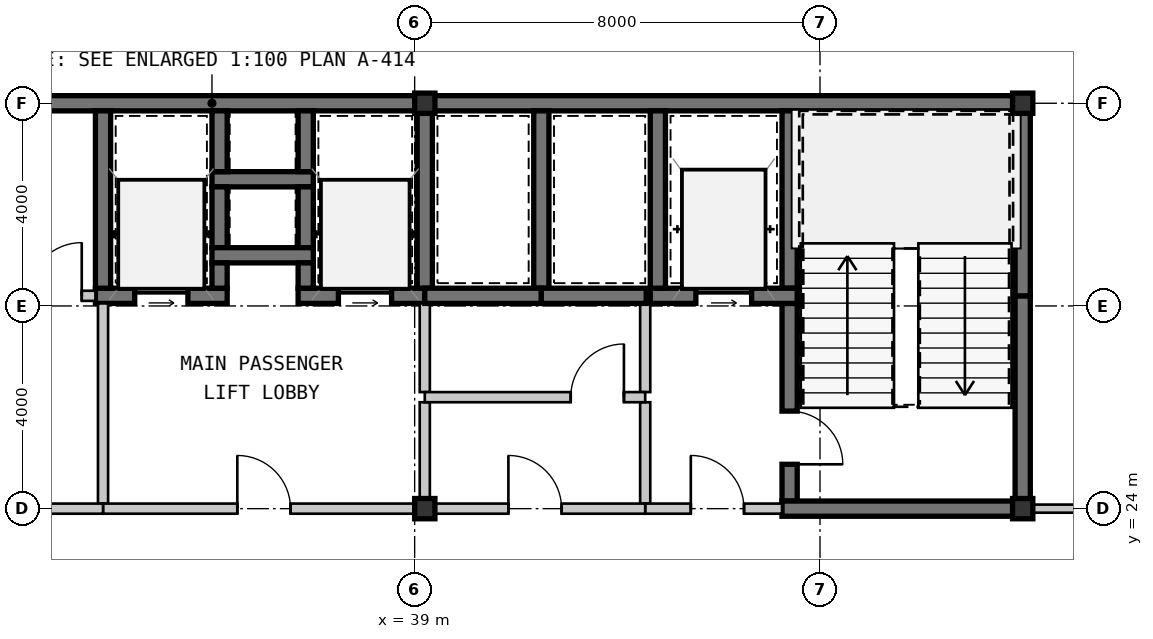
"""IFC4 building model, lengths in metres.
Left out: names, types, materials, properties, quantities, classifications, styles, units other than length and angle.
Written with IfcOpenShell. Run it as: python <this file> out.ifc"""

import sys

from ifc_helpers import new_model, si_unit, direction, frame, frame_2d, origin, origin_2d, place, context, subcontext, project, spatial, rectangle, hollow_rectangle, extrude, source, transform, mapped, element, fill, save


model = new_model("IFC4")
c1 = context("Model", 3, precision=1e-05, world=origin(), true_north=direction((0.0, 1.0)))
c2 = subcontext(c1, "Body", "Model", "MODEL_VIEW")
j1 = project(units=[si_unit("LENGTHUNIT", "METRE"), si_unit("PLANEANGLEUNIT", "RADIAN")], contexts=[c1])
p1 = place(None, origin())
s1 = spatial("IfcSite", under=j1, at=p1, CompositionType="ELEMENT")
p2 = place(p1, origin())
s2 = spatial("IfcBuilding", under=s1, at=p2, CompositionType="ELEMENT")
p3 = place(p2, frame((0.0, 0.0, 126.7)))
s3 = spatial("IfcBuildingStorey", under=s2, at=p3, CompositionType="ELEMENT", Elevation=126.7)
m1 = source(origin(), c2, "Body", "SweptSolid", [
    extrude(hollow_rectangle(XDim=0.4, YDim=0.4, WallThickness=0.016, at=origin_2d()), origin(), (0.0, 0.0, 1.0), 3.15),
])
for number, where, z_axis, x_axis in (
    (1, (39.2, 24.0, 0.0), (0.0, 0.0, 1.0), (1.0, 0.0, 0.0)),
    (2, (51.0, 24.0, 0.0), (0.0, 0.0, 1.0), (1.0, 0.0, 0.0)),
    (3, (39.2, 32.0, 0.0), (0.0, 0.0, 1.0), (1.0, 0.0, 0.0)),
    (4, (51.0, 32.0, 0.0), (0.0, 0.0, 1.0), (1.0, 0.0, 0.0)),
):
    element("IfcColumn", number, at=place(p3, frame(where, z_axis=z_axis, x_axis=x_axis)), inside=s3, PredefinedType="COLUMN", context=c2, shape_type="MappedRepresentation", body=[
        mapped(m1, transform((0.0, 0.0, 0.0), scale=1.0)),
    ])
m2 = source(origin(), c2, "Body", "SweptSolid", [
    extrude(rectangle(XDim=11.2, YDim=0.3, at=frame_2d((5.6, 0.0))), origin(), (0.0, 0.0, 1.0), 2.93),
])
p4 = place(p3, frame((28.0, 32.0, 0.0), z_axis=(0.0, 0.0, 1.0), x_axis=(1.0, 0.0, 0.0)))
e5 = element("IfcWall", 5, at=p4, inside=s3, PredefinedType="SHEAR", context=c2, shape_type="MappedRepresentation", body=[
    mapped(m2, transform((0.0, 0.0, 0.0), scale=1.0)),
])
m3 = source(origin(), c2, "Body", "SweptSolid", [
    extrude(rectangle(XDim=11.95, YDim=0.3, at=frame_2d((5.975, 0.0))), origin(), (0.0, 0.0, 1.0), 2.93),
])
p5 = place(p3, frame((39.2, 32.0, 0.0), z_axis=(0.0, 0.0, 1.0), x_axis=(1.0, 0.0, 0.0)))
e6 = element("IfcWall", 6, at=p5, inside=s3, PredefinedType="SHEAR", context=c2, shape_type="MappedRepresentation", body=[
    mapped(m3, transform((0.0, 0.0, 0.0), scale=1.0)),
])
m4 = source(origin(), c2, "Body", "SweptSolid", [
    extrude(rectangle(XDim=4.05, YDim=0.3, at=frame_2d((2.025, 0.0))), origin(), (0.0, 0.0, 1.0), 2.93),
])
p6 = place(p3, frame((51.0, 24.15, 0.0), z_axis=(0.0, 0.0, 1.0), x_axis=(0.0, 1.0, 0.0)))
e7 = element("IfcWall", 7, at=p6, inside=s3, PredefinedType="SHEAR", context=c2, shape_type="MappedRepresentation", body=[
    mapped(m4, transform((0.0, 0.0, 0.0), scale=1.0)),
])
m5 = source(origin(), c2, "Body", "SweptSolid", [
    extrude(rectangle(XDim=3.65, YDim=0.3, at=frame_2d((1.825, 0.0))), origin(), (0.0, 0.0, 1.0), 2.93),
])
p7 = place(p3, frame((51.0, 28.2, 0.0), z_axis=(0.0, 0.0, 1.0), x_axis=(0.0, 1.0, 0.0)))
e8 = element("IfcWall", 8, at=p7, inside=s3, PredefinedType="SHEAR", context=c2, shape_type="MappedRepresentation", body=[
    mapped(m5, transform((0.0, 0.0, 0.0), scale=1.0)),
])
m6 = source(origin(), c2, "Body", "SweptSolid", [
    extrude(rectangle(XDim=3.5, YDim=0.3, at=frame_2d((1.75, 0.0))), origin(), (0.0, 0.0, 1.0), 2.93),
])
p8 = place(p3, frame((46.4, 31.85, 0.0), z_axis=(0.0, 0.0, 1.0), x_axis=(0.0, -1.0, 0.0)))
e9 = element("IfcWall", 9, at=p8, inside=s3, PredefinedType="SHEAR", context=c2, shape_type="MappedRepresentation", body=[
    mapped(m6, transform((0.0, 0.0, 0.0), scale=1.0)),
])
m7 = source(origin(), c2, "Body", "SweptSolid", [
    extrude(rectangle(XDim=3.9, YDim=0.3, at=frame_2d((1.95, 0.0))), origin(), (0.0, 0.0, 1.0), 2.93),
])
p9 = place(p3, frame((46.4, 28.05, 0.0), z_axis=(0.0, 0.0, 1.0), x_axis=(0.0, -1.0, 0.0)))
e10 = element("IfcWall", 10, at=p9, inside=s3, PredefinedType="SHEAR", context=c2, shape_type="MappedRepresentation", body=[
    mapped(m7, transform((0.0, 0.0, 0.0), scale=1.0)),
])
m8 = source(origin(), c2, "Body", "SweptSolid", [
    extrude(rectangle(XDim=1.05, YDim=2.1, at=frame_2d((0.525, 1.05))), frame((0.0, 0.16, 0.0), z_axis=(0.0, -1.0, 0.0), x_axis=(1.0, 0.0, 0.0)), (0.0, 0.0, 1.0), 0.32),
])
p10 = place(p9, frame((2.125, 0.0, 0.0)))
e11 = element("IfcOpeningElement", 11, at=p10, cuts=e10, PredefinedType="OPENING", context=c2, shape_type="MappedRepresentation", body=[
    mapped(m8, transform((0.0, 0.0, 0.0), scale=1.0)),
])
m9 = source(origin(), c2, "Body", "SweptSolid", [
    extrude(rectangle(XDim=4.9, YDim=0.3, at=frame_2d((2.45, 0.0))), origin(), (0.0, 0.0, 1.0), 2.93),
])
p11 = place(p3, frame((46.25, 24.0, 0.0), z_axis=(0.0, 0.0, 1.0), x_axis=(1.0, 0.0, 0.0)))
e12 = element("IfcWall", 12, at=p11, inside=s3, PredefinedType="SHEAR", context=c2, shape_type="MappedRepresentation", body=[
    mapped(m9, transform((0.0, 0.0, 0.0), scale=1.0)),
])
m10 = source(origin(), c2, "Body", "SweptSolid", [
    extrude(rectangle(XDim=2.9, YDim=0.3, at=frame_2d((1.45, 0.0))), origin(), (0.0, 0.0, 1.0), 2.93),
])
p12 = place(p3, frame((43.65, 28.2, 0.0), z_axis=(0.0, 0.0, 1.0), x_axis=(1.0, 0.0, 0.0)))
e13 = element("IfcWall", 13, at=p12, inside=s3, PredefinedType="SHEAR", context=c2, shape_type="MappedRepresentation", body=[
    mapped(m10, transform((0.0, 0.0, 0.0), scale=1.0)),
])
m11 = source(origin(), c2, "Body", "SweptSolid", [
    extrude(rectangle(XDim=1.1, YDim=2.15, at=frame_2d((0.55, 1.075))), frame((0.0, 0.16, 0.0), z_axis=(0.0, -1.0, 0.0), x_axis=(1.0, 0.0, 0.0)), (0.0, 0.0, 1.0), 0.32),
])
p13 = place(p12, frame((0.9, 0.0, 0.0)))
e14 = element("IfcOpeningElement", 14, at=p13, cuts=e13, PredefinedType="OPENING", context=c2, shape_type="MappedRepresentation", body=[
    mapped(m11, transform((0.0, 0.0, 0.0), scale=1.0)),
])
p14 = place(p3, frame((43.8, 31.85, 0.0), z_axis=(0.0, 0.0, 1.0), x_axis=(0.0, -1.0, 0.0)))
e15 = element("IfcWall", 15, at=p14, inside=s3, PredefinedType="SHEAR", context=c2, shape_type="MappedRepresentation", body=[
    mapped(m6, transform((0.0, 0.0, 0.0), scale=1.0)),
])
m12 = source(origin(), c2, "Body", "SweptSolid", [
    extrude(rectangle(XDim=2.0, YDim=0.2, at=frame_2d((1.0, 0.0))), origin(), (0.0, 0.0, 1.0), 2.93),
])
p15 = place(p3, frame((43.55, 26.1, 0.0), z_axis=(0.0, 0.0, 1.0), x_axis=(0.0, -1.0, 0.0)))
e16 = element("IfcWall", 16, at=p15, inside=s3, PredefinedType="SOLIDWALL", context=c2, shape_type="MappedRepresentation", body=[
    mapped(m12, transform((0.0, 0.0, 0.0), scale=1.0)),
])
m13 = source(origin(), c2, "Body", "SweptSolid", [
    extrude(rectangle(XDim=1.75, YDim=0.2, at=frame_2d((0.875, 0.0))), origin(), (0.0, 0.0, 1.0), 2.93),
])
p16 = place(p3, frame((43.55, 28.05, 0.0), z_axis=(0.0, 0.0, 1.0), x_axis=(0.0, -1.0, 0.0)))
e17 = element("IfcWall", 17, at=p16, inside=s3, PredefinedType="SOLIDWALL", context=c2, shape_type="MappedRepresentation", body=[
    mapped(m13, transform((0.0, 0.0, 0.0), scale=1.0)),
])
m14 = source(origin(), c2, "Body", "SweptSolid", [
    extrude(rectangle(XDim=2.7, YDim=0.2, at=frame_2d((1.35, 0.0))), origin(), (0.0, 0.0, 1.0), 2.397),
])
p17 = place(p3, frame((43.55, 24.0, 0.0), z_axis=(0.0, 0.0, 1.0), x_axis=(1.0, 0.0, 0.0)))
e18 = element("IfcWall", 18, at=p17, inside=s3, PredefinedType="SOLIDWALL", context=c2, shape_type="MappedRepresentation", body=[
    mapped(m14, transform((0.0, 0.0, 0.0), scale=1.0)),
])
m15 = source(origin(), c2, "Body", "SweptSolid", [
    extrude(rectangle(XDim=1.05, YDim=2.1, at=frame_2d((0.525, 1.05))), frame((0.0, 0.11, 0.0), z_axis=(0.0, -1.0, 0.0), x_axis=(1.0, 0.0, 0.0)), (0.0, 0.0, 1.0), 0.22),
])
p18 = place(p17, frame((0.9, 0.0, 0.0)))
e19 = element("IfcOpeningElement", 19, at=p18, cuts=e18, PredefinedType="OPENING", context=c2, shape_type="MappedRepresentation", body=[
    mapped(m15, transform((0.0, 0.0, 0.0), scale=1.0)),
])
m16 = source(origin(), c2, "Body", "SweptSolid", [
    extrude(rectangle(XDim=2.0, YDim=0.3, at=frame_2d((1.0, 0.0))), origin(), (0.0, 0.0, 1.0), 2.93),
])
p19 = place(p3, frame((35.0, 30.5, 0.0), z_axis=(0.0, 0.0, 1.0), x_axis=(1.0, 0.0, 0.0)))
e20 = element("IfcWall", 20, at=p19, inside=s3, PredefinedType="SHEAR", context=c2, shape_type="MappedRepresentation", body=[
    mapped(m16, transform((0.0, 0.0, 0.0), scale=1.0)),
])
m17 = source(origin(), c2, "Body", "SweptSolid", [
    extrude(rectangle(XDim=1.2, YDim=0.3, at=frame_2d((0.6, 0.0))), origin(), (0.0, 0.0, 1.0), 2.93),
])
for number, where, z_axis, x_axis in (
    (21, (35.15, 31.85, 0.0), (0.0, 0.0, 1.0), (0.0, -1.0, 0.0)),
    (22, (36.85, 30.65, 0.0), (0.0, 0.0, 1.0), (0.0, 1.0, 0.0)),
    (23, (35.15, 30.35, 0.0), (0.0, 0.0, 1.0), (0.0, -1.0, 0.0)),
    (24, (36.85, 29.15, 0.0), (0.0, 0.0, 1.0), (0.0, 1.0, 0.0)),
):
    element("IfcWall", number, at=place(p3, frame(where, z_axis=z_axis, x_axis=x_axis)), inside=s3, PredefinedType="SHEAR", context=c2, shape_type="MappedRepresentation", body=[
        mapped(m17, transform((0.0, 0.0, 0.0), scale=1.0)),
    ])
p20 = place(p3, frame((35.0, 29.0, 0.0), z_axis=(0.0, 0.0, 1.0), x_axis=(1.0, 0.0, 0.0)))
e25 = element("IfcWall", 25, at=p20, inside=s3, PredefinedType="SHEAR", context=c2, shape_type="MappedRepresentation", body=[
    mapped(m16, transform((0.0, 0.0, 0.0), scale=1.0)),
])
m18 = source(origin(), c2, "Body", "SweptSolid", [
    extrude(rectangle(XDim=2.6, YDim=0.3, at=frame_2d((1.3, 0.0))), origin(), (0.0, 0.0, 1.0), 2.93),
])
p21 = place(p3, frame((32.7, 28.2, 0.0), z_axis=(0.0, 0.0, 1.0), x_axis=(1.0, 0.0, 0.0)))
e26 = element("IfcWall", 26, at=p21, inside=s3, PredefinedType="SHEAR", context=c2, shape_type="MappedRepresentation", body=[
    mapped(m18, transform((0.0, 0.0, 0.0), scale=1.0)),
])
m19 = source(origin(), c2, "Body", "SweptSolid", [
    extrude(rectangle(XDim=1.05, YDim=2.15, at=frame_2d((0.525, 1.075))), frame((0.0, 0.16, 0.0), z_axis=(0.0, -1.0, 0.0), x_axis=(1.0, 0.0, 0.0)), (0.0, 0.0, 1.0), 0.32),
])
p22 = place(p21, frame((0.775, 0.0, 0.0)))
e27 = element("IfcOpeningElement", 27, at=p22, cuts=e26, PredefinedType="OPENING", context=c2, shape_type="MappedRepresentation", body=[
    mapped(m19, transform((0.0, 0.0, 0.0), scale=1.0)),
])
m20 = source(origin(), c2, "Body", "SweptSolid", [
    extrude(rectangle(XDim=0.5, YDim=0.3, at=frame_2d((0.25, 0.0))), origin(), (0.0, 0.0, 1.0), 2.93),
])
p23 = place(p3, frame((35.15, 28.35, 0.0), z_axis=(0.0, 0.0, 1.0), x_axis=(0.0, 1.0, 0.0)))
e28 = element("IfcWall", 28, at=p23, inside=s3, PredefinedType="SHEAR", context=c2, shape_type="MappedRepresentation", body=[
    mapped(m20, transform((0.0, 0.0, 0.0), scale=1.0)),
])
p24 = place(p3, frame((32.85, 31.85, 0.0), z_axis=(0.0, 0.0, 1.0), x_axis=(0.0, -1.0, 0.0)))
e29 = element("IfcWall", 29, at=p24, inside=s3, PredefinedType="SHEAR", context=c2, shape_type="MappedRepresentation", body=[
    mapped(m6, transform((0.0, 0.0, 0.0), scale=1.0)),
])
m21 = source(origin(), c2, "Body", "SweptSolid", [
    extrude(rectangle(XDim=2.5, YDim=0.3, at=frame_2d((1.25, 0.0))), origin(), (0.0, 0.0, 1.0), 2.93),
])
p25 = place(p3, frame((36.7, 28.2, 0.0), z_axis=(0.0, 0.0, 1.0), x_axis=(1.0, 0.0, 0.0)))
e30 = element("IfcWall", 30, at=p25, inside=s3, PredefinedType="SHEAR", context=c2, shape_type="MappedRepresentation", body=[
    mapped(m21, transform((0.0, 0.0, 0.0), scale=1.0)),
])
p26 = place(p25, frame((0.795, 0.0, 0.0)))
e31 = element("IfcOpeningElement", 31, at=p26, cuts=e30, PredefinedType="OPENING", context=c2, shape_type="MappedRepresentation", body=[
    mapped(m19, transform((0.0, 0.0, 0.0), scale=1.0)),
])
p27 = place(p3, frame((36.85, 28.85, 0.0), z_axis=(0.0, 0.0, 1.0), x_axis=(0.0, -1.0, 0.0)))
e32 = element("IfcWall", 32, at=p27, inside=s3, PredefinedType="SHEAR", context=c2, shape_type="MappedRepresentation", body=[
    mapped(m20, transform((0.0, 0.0, 0.0), scale=1.0)),
])
p28 = place(p3, frame((39.2, 28.35, 0.0), z_axis=(0.0, 0.0, 1.0), x_axis=(0.0, 1.0, 0.0)))
e33 = element("IfcWall", 33, at=p28, inside=s3, PredefinedType="SHEAR", context=c2, shape_type="MappedRepresentation", body=[
    mapped(m6, transform((0.0, 0.0, 0.0), scale=1.0)),
])
m22 = source(origin(), c2, "Body", "SweptSolid", [
    extrude(rectangle(XDim=3.95, YDim=0.2, at=frame_2d((1.975, 0.0))), origin(), (0.0, 0.0, 1.0), 2.93),
])
p29 = place(p3, frame((32.85, 24.1, 0.0), z_axis=(0.0, 0.0, 1.0), x_axis=(0.0, 1.0, 0.0)))
e34 = element("IfcWall", 34, at=p29, inside=s3, PredefinedType="SOLIDWALL", context=c2, shape_type="MappedRepresentation", body=[
    mapped(m22, transform((0.0, 0.0, 0.0), scale=1.0)),
])
m23 = source(origin(), c2, "Body", "SweptSolid", [
    extrude(rectangle(XDim=2.0, YDim=0.2, at=frame_2d((1.0, 0.0))), origin(), (0.0, 0.0, 1.0), 2.47),
])
p30 = place(p3, frame((39.2, 26.1, 0.0), z_axis=(0.0, 0.0, 1.0), x_axis=(0.0, -1.0, 0.0)))
e35 = element("IfcWall", 35, at=p30, inside=s3, PredefinedType="SOLIDWALL", context=c2, shape_type="MappedRepresentation", body=[
    mapped(m23, transform((0.0, 0.0, 0.0), scale=1.0)),
])
m24 = source(origin(), c2, "Body", "SweptSolid", [
    extrude(rectangle(XDim=1.75, YDim=0.2, at=frame_2d((0.875, 0.0))), origin(), (0.0, 0.0, 1.0), 2.47),
])
p31 = place(p3, frame((39.2, 28.05, 0.0), z_axis=(0.0, 0.0, 1.0), x_axis=(0.0, -1.0, 0.0)))
e36 = element("IfcWall", 36, at=p31, inside=s3, PredefinedType="SOLIDWALL", context=c2, shape_type="MappedRepresentation", body=[
    mapped(m24, transform((0.0, 0.0, 0.0), scale=1.0)),
])
m25 = source(origin(), c2, "Body", "SweptSolid", [
    extrude(rectangle(XDim=6.35, YDim=0.2, at=frame_2d((3.175, 0.0))), origin(), (0.0, 0.0, 1.0), 2.47),
])
p32 = place(p3, frame((39.2, 24.0, 0.0), z_axis=(0.0, 0.0, 1.0), x_axis=(-1.0, 0.0, 0.0)))
e37 = element("IfcWall", 37, at=p32, inside=s3, PredefinedType="SOLIDWALL", context=c2, shape_type="MappedRepresentation", body=[
    mapped(m25, transform((0.0, 0.0, 0.0), scale=1.0)),
])
p33 = place(p32, frame((2.65, 0.0, 0.0)))
e38 = element("IfcOpeningElement", 38, at=p33, cuts=e37, PredefinedType="OPENING", context=c2, shape_type="MappedRepresentation", body=[
    mapped(m15, transform((0.0, 0.0, 0.0), scale=1.0)),
])
p34 = place(p3, frame((41.5, 28.35, 0.0), z_axis=(0.0, 0.0, 1.0), x_axis=(0.0, 1.0, 0.0)))
e39 = element("IfcWall", 39, at=p34, inside=s3, PredefinedType="SHEAR", context=c2, shape_type="MappedRepresentation", body=[
    mapped(m6, transform((0.0, 0.0, 0.0), scale=1.0)),
])
m26 = source(origin(), c2, "Body", "SweptSolid", [
    extrude(rectangle(XDim=2.3, YDim=0.3, at=frame_2d((1.15, 0.0))), origin(), (0.0, 0.0, 1.0), 2.93),
])
p35 = place(p3, frame((39.2, 28.2, 0.0), z_axis=(0.0, 0.0, 1.0), x_axis=(1.0, 0.0, 0.0)))
e40 = element("IfcWall", 40, at=p35, inside=s3, PredefinedType="SHEAR", context=c2, shape_type="MappedRepresentation", body=[
    mapped(m26, transform((0.0, 0.0, 0.0), scale=1.0)),
])
m27 = source(origin(), c2, "Body", "SweptSolid", [
    extrude(rectangle(XDim=2.07, YDim=0.3, at=frame_2d((1.035, 0.0))), origin(), (0.0, 0.0, 1.0), 2.93),
])
p36 = place(p3, frame((41.5, 28.2, 0.0), z_axis=(0.0, 0.0, 1.0), x_axis=(1.0, 0.0, 0.0)))
e41 = element("IfcWall", 41, at=p36, inside=s3, PredefinedType="SHEAR", context=c2, shape_type="MappedRepresentation", body=[
    mapped(m27, transform((0.0, 0.0, 0.0), scale=1.0)),
])
m28 = source(origin(), c2, "Body", "SweptSolid", [
    extrude(rectangle(XDim=6.25, YDim=0.2, at=frame_2d((3.125, 0.0))), origin(), (0.0, 0.0, 1.0), 2.93),
])
p37 = place(p3, frame((26.45, 28.2, 0.0), z_axis=(0.0, 0.0, 1.0), x_axis=(1.0, 0.0, 0.0)))
e42 = element("IfcWall", 42, at=p37, inside=s3, PredefinedType="SOLIDWALL", context=c2, shape_type="MappedRepresentation", body=[
    mapped(m28, transform((0.0, 0.0, 0.0), scale=1.0)),
])
p38 = place(p37, frame((4.93, 0.0, 0.0)))
e43 = element("IfcOpeningElement", 43, at=p38, cuts=e42, PredefinedType="OPENING", context=c2, shape_type="MappedRepresentation", body=[
    mapped(m15, transform((0.0, 0.0, 0.0), scale=1.0)),
])
m29 = source(origin(), c2, "Body", "SweptSolid", [
    extrude(rectangle(XDim=6.4, YDim=0.2, at=frame_2d((3.2, 0.0))), origin(), (0.0, 0.0, 1.0), 2.47),
])
p39 = place(p3, frame((32.85, 24.0, 0.0), z_axis=(0.0, 0.0, 1.0), x_axis=(-1.0, 0.0, 0.0)))
e44 = element("IfcWall", 44, at=p39, inside=s3, PredefinedType="SOLIDWALL", context=c2, shape_type="MappedRepresentation", body=[
    mapped(m29, transform((0.0, 0.0, 0.0), scale=1.0)),
])
p40 = place(p39, frame((2.675, 0.0, 0.0)))
e45 = element("IfcOpeningElement", 45, at=p40, cuts=e44, PredefinedType="OPENING", context=c2, shape_type="MappedRepresentation", body=[
    mapped(m15, transform((0.0, 0.0, 0.0), scale=1.0)),
])
m30 = source(origin(), c2, "Body", "SweptSolid", [
    extrude(rectangle(XDim=4.35, YDim=0.2, at=frame_2d((2.175, 0.0))), origin(), (0.0, 0.0, 1.0), 2.93),
])
p41 = place(p3, frame((39.2, 26.2, 0.0), z_axis=(0.0, 0.0, 1.0), x_axis=(1.0, 0.0, 0.0)))
e46 = element("IfcWall", 46, at=p41, inside=s3, PredefinedType="SOLIDWALL", context=c2, shape_type="MappedRepresentation", body=[
    mapped(m30, transform((0.0, 0.0, 0.0), scale=1.0)),
])
p42 = place(p41, frame((2.88, 0.0, 0.0)))
e47 = element("IfcOpeningElement", 47, at=p42, cuts=e46, PredefinedType="OPENING", context=c2, shape_type="MappedRepresentation", body=[
    mapped(m15, transform((0.0, 0.0, 0.0), scale=1.0)),
])
m31 = source(origin(), c2, "Body", "SweptSolid", [
    extrude(rectangle(XDim=4.35, YDim=0.2, at=frame_2d((2.175, 0.0))), origin(), (0.0, 0.0, 1.0), 2.397),
])
p43 = place(p3, frame((43.55, 24.0, 0.0), z_axis=(0.0, 0.0, 1.0), x_axis=(-1.0, 0.0, 0.0)))
e48 = element("IfcWall", 48, at=p43, inside=s3, PredefinedType="SOLIDWALL", context=c2, shape_type="MappedRepresentation", body=[
    mapped(m31, transform((0.0, 0.0, 0.0), scale=1.0)),
])
p44 = place(p43, frame((1.65, 0.0, 0.0)))
e49 = element("IfcOpeningElement", 49, at=p44, cuts=e48, PredefinedType="OPENING", context=c2, shape_type="MappedRepresentation", body=[
    mapped(m15, transform((0.0, 0.0, 0.0), scale=1.0)),
])
m32 = source(origin(), c2, "Body", "SweptSolid", [
    extrude(rectangle(XDim=10.1, YDim=0.16, at=frame_2d((5.05, 0.0))), origin(), (0.0, 0.0, 1.0), 2.93),
])
p45 = place(p3, frame((51.15, 24.0, 0.0), z_axis=(0.0, 0.0, 1.0), x_axis=(1.0, 0.0, 0.0)))
e50 = element("IfcWall", 50, at=p45, inside=s3, PredefinedType="PARTITIONING", context=c2, shape_type="MappedRepresentation", body=[
    mapped(m32, transform((0.0, 0.0, 0.0), scale=1.0)),
])
m33 = source(origin(), c2, "Body", "SweptSolid", [
    extrude(rectangle(XDim=0.92, YDim=2.1, at=frame_2d((0.46, 1.05))), frame((0.0, 0.09, 0.0), z_axis=(0.0, -1.0, 0.0), x_axis=(1.0, 0.0, 0.0)), (0.0, 0.0, 1.0), 0.18),
])
p46 = place(p45, frame((4.525, 0.0, 0.0)))
e51 = element("IfcOpeningElement", 51, at=p46, cuts=e50, PredefinedType="OPENING", context=c2, shape_type="MappedRepresentation", body=[
    mapped(m33, transform((0.0, 0.0, 0.0), scale=1.0)),
])
m34 = source(origin(), c2, "Body", "SweptSolid", [
    extrude(rectangle(XDim=1.05, YDim=2.1, at=frame_2d((0.525, 1.05))), frame((0.0, 0.025, 0.0), z_axis=(0.0, -1.0, 0.0), x_axis=(1.0, 0.0, 0.0)), (0.0, 0.0, 1.0), 0.05),
])
p47 = place(p10, origin())
e52 = element("IfcDoor", 52, at=p47, inside=s3, OperationType="SINGLE_SWING_RIGHT", PredefinedType="DOOR", context=c2, shape_type="MappedRepresentation", body=[
    mapped(m34, transform((0.0, 0.0, 0.0), scale=1.0)),
])
fill(e11, e52)
m35 = source(origin(), c2, "Body", "SweptSolid", [
    extrude(rectangle(XDim=1.1, YDim=2.15, at=frame_2d((0.55, 1.075))), frame((0.0, 0.025, 0.0), z_axis=(0.0, -1.0, 0.0), x_axis=(1.0, 0.0, 0.0)), (0.0, 0.0, 1.0), 0.05),
])
p48 = place(p13, origin())
e53 = element("IfcDoor", 53, at=p48, inside=s3, OperationType="SLIDING_TO_LEFT", PredefinedType="DOOR", context=c2, shape_type="MappedRepresentation", body=[
    mapped(m35, transform((0.0, 0.0, 0.0), scale=1.0)),
])
fill(e14, e53)
p49 = place(p18, origin())
e54 = element("IfcDoor", 54, at=p49, inside=s3, OperationType="SINGLE_SWING_LEFT", PredefinedType="DOOR", context=c2, shape_type="MappedRepresentation", body=[
    mapped(m34, transform((0.0, 0.0, 0.0), scale=1.0)),
])
fill(e19, e54)
m36 = source(origin(), c2, "Body", "SweptSolid", [
    extrude(rectangle(XDim=1.05, YDim=2.15, at=frame_2d((0.525, 1.075))), frame((0.0, 0.025, 0.0), z_axis=(0.0, -1.0, 0.0), x_axis=(1.0, 0.0, 0.0)), (0.0, 0.0, 1.0), 0.05),
])
p50 = place(p22, origin())
e55 = element("IfcDoor", 55, at=p50, inside=s3, OperationType="SLIDING_TO_LEFT", PredefinedType="DOOR", context=c2, shape_type="MappedRepresentation", body=[
    mapped(m36, transform((0.0, 0.0, 0.0), scale=1.0)),
])
fill(e27, e55)
p51 = place(p26, origin())
e56 = element("IfcDoor", 56, at=p51, inside=s3, OperationType="SLIDING_TO_LEFT", PredefinedType="DOOR", context=c2, shape_type="MappedRepresentation", body=[
    mapped(m36, transform((0.0, 0.0, 0.0), scale=1.0)),
])
fill(e31, e56)
p52 = place(p33, frame((1.05, 0.0, 0.0), z_axis=(0.0, 0.0, 1.0), x_axis=(-1.0, 0.0, 0.0)))
e57 = element("IfcDoor", 57, at=p52, inside=s3, OperationType="SINGLE_SWING_LEFT", PredefinedType="DOOR", context=c2, shape_type="MappedRepresentation", body=[
    mapped(m34, transform((0.0, 0.0, 0.0), scale=1.0)),
])
fill(e38, e57)
p53 = place(p38, origin())
e58 = element("IfcDoor", 58, at=p53, inside=s3, OperationType="SINGLE_SWING_RIGHT", PredefinedType="DOOR", context=c2, shape_type="MappedRepresentation", body=[
    mapped(m34, transform((0.0, 0.0, 0.0), scale=1.0)),
])
fill(e43, e58)
p54 = place(p42, origin())
e59 = element("IfcDoor", 59, at=p54, inside=s3, OperationType="SINGLE_SWING_RIGHT", PredefinedType="DOOR", context=c2, shape_type="MappedRepresentation", body=[
    mapped(m34, transform((0.0, 0.0, 0.0), scale=1.0)),
])
fill(e47, e59)
p55 = place(p44, frame((1.05, 0.0, 0.0), z_axis=(0.0, 0.0, 1.0), x_axis=(-1.0, 0.0, 0.0)))
e60 = element("IfcDoor", 60, at=p55, inside=s3, OperationType="SINGLE_SWING_LEFT", PredefinedType="DOOR", context=c2, shape_type="MappedRepresentation", body=[
    mapped(m34, transform((0.0, 0.0, 0.0), scale=1.0)),
])
fill(e49, e60)
save(model, sys.argv[1])
